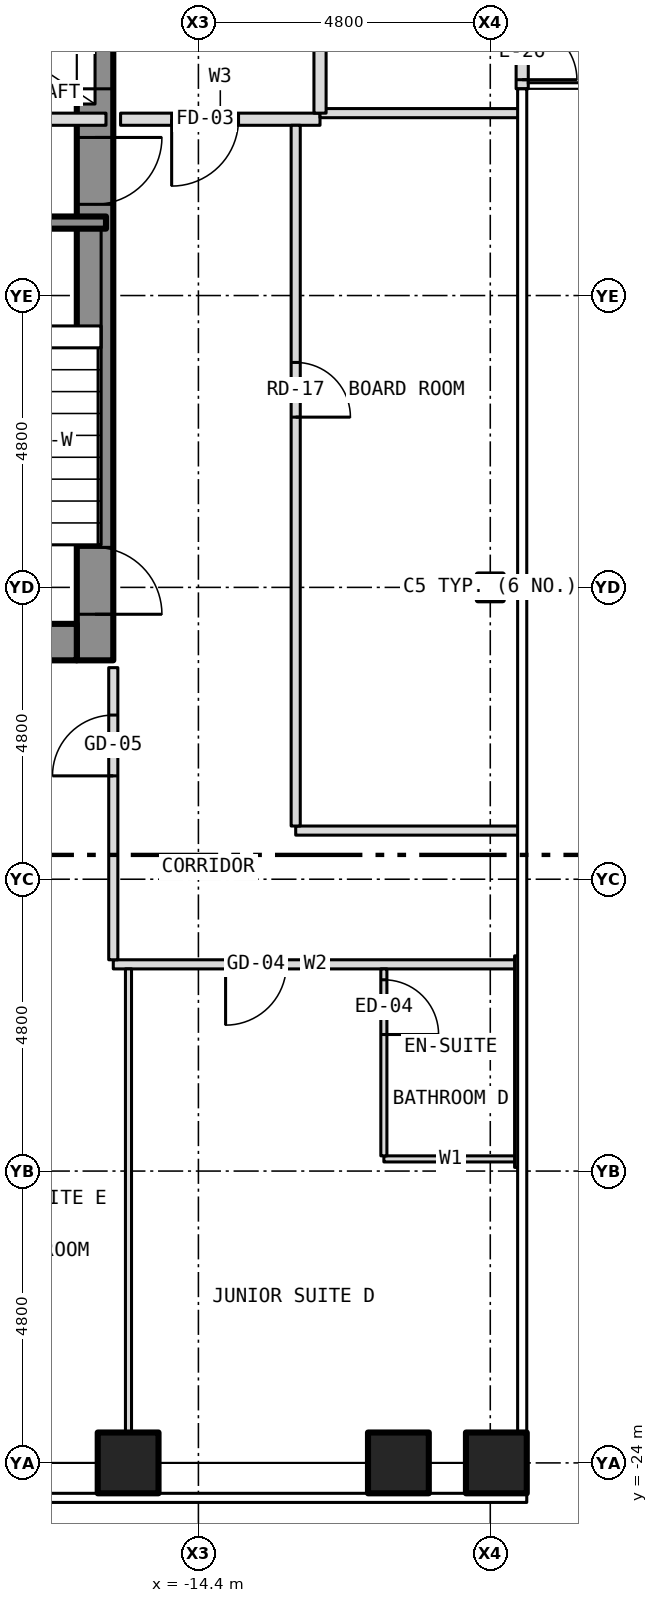
"""IFC4 building model, lengths in metres.
Left out: names, types, materials, properties, quantities, classifications, styles, units other than length and angle.
Written with IfcOpenShell. Run it as: python <this file> out.ifc"""

import sys

from ifc_helpers import new_model, si_unit, direction, frame, frame_2d, origin, origin_2d, place, context, subcontext, project, spatial, rectangle, hollow_rectangle, i_section, extrude, element, fill, save


model = new_model("IFC4")
c1 = context("Model", 3, precision=1e-05, world=origin(), true_north=direction((0.0, 1.0)))
c2 = subcontext(c1, "Body", "Model", "MODEL_VIEW")
j1 = project(units=[si_unit("LENGTHUNIT", "METRE"), si_unit("PLANEANGLEUNIT", "RADIAN")], contexts=[c1])
p1 = place(None, origin())
s1 = spatial("IfcSite", under=j1, at=p1, CompositionType="ELEMENT")
p2 = place(p1, origin())
s2 = spatial("IfcBuilding", under=s1, at=p2, CompositionType="ELEMENT")
p3 = place(p2, frame((0.0, 0.0, 67.0)))
s3 = spatial("IfcBuildingStorey", under=s2, at=p3, CompositionType="ELEMENT", Elevation=67.0)
for number, where, z_axis, x_axis in (
    (1, (-15.556, -24.0, -0.15), (0.0, 0.0, 1.0), (1.0, 0.0, 0.0)),
    (2, (-11.111, -24.0, -0.15), (0.0, 0.0, 1.0), (1.0, 0.0, 0.0)),
    (3, (-9.5, -24.0, -0.15), (0.0, 0.0, 1.0), (1.0, 0.0, 0.0)),
):
    element("IfcColumn", number, at=place(p3, frame(where, z_axis=z_axis, x_axis=x_axis)), inside=s3, PredefinedType="COLUMN", context=c2, shape_type="SweptSolid", body=[
        extrude(hollow_rectangle(XDim=1.0, YDim=1.0, WallThickness=0.06, at=origin_2d()), origin(), (0.0, 0.0, 1.0), 3.5),
    ])
p4 = place(p3, frame((-9.6, -9.6, -0.15), z_axis=(0.0, 0.0, 1.0), x_axis=(1.0, 0.0, 0.0)))
e4 = element("IfcColumn", 4, at=p4, inside=s3, PredefinedType="COLUMN", context=c2, shape_type="SweptSolid", body=[
    extrude(i_section(OverallWidth=0.409, OverallDepth=0.424, WebThickness=0.033, FlangeThickness=0.052, at=origin_2d()), origin(), (0.0, 0.0, 1.0), 3.5),
])
p5 = place(p3, frame((-16.1, -10.8, 0.0), z_axis=(0.0, 0.0, 1.0), x_axis=(0.0, 1.0, 0.0)))
e5 = element("IfcWall", 5, at=p5, inside=s3, PredefinedType="SHEAR", context=c2, shape_type="SweptSolid", body=[
    extrude(rectangle(XDim=21.6, YDim=0.6, at=frame_2d((10.8, 0.0))), origin(), (0.0, 0.0, 1.0), 3.25),
])
p6 = place(p5, frame((9.4, 0.0, 0.0)))
e6 = element("IfcOpeningElement", 6, at=p6, cuts=e5, PredefinedType="OPENING", context=c2, shape_type="SweptSolid", body=[
    extrude(rectangle(XDim=1.1, YDim=2.1, at=frame_2d((0.55, 1.05))), frame((0.0, 0.312, 0.0), z_axis=(0.0, -1.0, 0.0), x_axis=(1.0, 0.0, 0.0)), (0.0, 0.0, 1.0), 0.624),
])
p7 = place(p5, frame((11.5, 0.0, 0.0)))
e7 = element("IfcOpeningElement", 7, at=p7, cuts=e5, PredefinedType="OPENING", context=c2, shape_type="SweptSolid", body=[
    extrude(rectangle(XDim=1.1, YDim=2.1, at=frame_2d((0.55, 1.05))), frame((0.0, 0.312, 0.0), z_axis=(0.0, -1.0, 0.0), x_axis=(1.0, 0.0, 0.0)), (0.0, 0.0, 1.0), 0.624),
])
p8 = place(p5, frame((13.6, 0.0, 0.0)))
e8 = element("IfcOpeningElement", 8, at=p8, cuts=e5, PredefinedType="OPENING", context=c2, shape_type="SweptSolid", body=[
    extrude(rectangle(XDim=1.1, YDim=2.1, at=frame_2d((0.55, 1.05))), frame((0.0, 0.312, 0.0), z_axis=(0.0, -1.0, 0.0), x_axis=(1.0, 0.0, 0.0)), (0.0, 0.0, 1.0), 0.624),
])
p9 = place(p5, frame((15.7, 0.0, 0.0)))
e9 = element("IfcOpeningElement", 9, at=p9, cuts=e5, PredefinedType="OPENING", context=c2, shape_type="SweptSolid", body=[
    extrude(rectangle(XDim=1.1, YDim=2.1, at=frame_2d((0.55, 1.05))), frame((0.0, 0.312, 0.0), z_axis=(0.0, -1.0, 0.0), x_axis=(1.0, 0.0, 0.0)), (0.0, 0.0, 1.0), 0.624),
])
p10 = place(p5, frame((17.8, 0.0, 0.0)))
e10 = element("IfcOpeningElement", 10, at=p10, cuts=e5, PredefinedType="OPENING", context=c2, shape_type="SweptSolid", body=[
    extrude(rectangle(XDim=1.1, YDim=2.1, at=frame_2d((0.55, 1.05))), frame((0.0, 0.312, 0.0), z_axis=(0.0, -1.0, 0.0), x_axis=(1.0, 0.0, 0.0)), (0.0, 0.0, 1.0), 0.624),
])
p11 = place(p5, frame((0.758, 0.0, 0.0)))
e11 = element("IfcOpeningElement", 11, at=p11, cuts=e5, PredefinedType="OPENING", context=c2, shape_type="SweptSolid", body=[
    extrude(rectangle(XDim=1.1, YDim=2.1, at=frame_2d((0.55, 1.05))), frame((0.0, 0.312, 0.0), z_axis=(0.0, -1.0, 0.0), x_axis=(1.0, 0.0, 0.0)), (0.0, 0.0, 1.0), 0.624),
])
p12 = place(p5, frame((7.5, 0.0, 0.0)))
e12 = element("IfcOpeningElement", 12, at=p12, cuts=e5, PredefinedType="OPENING", context=c2, shape_type="SweptSolid", body=[
    extrude(rectangle(XDim=1.1, YDim=2.1, at=frame_2d((0.55, 1.05))), frame((0.0, 0.312, 0.0), z_axis=(0.0, -1.0, 0.0), x_axis=(1.0, 0.0, 0.0)), (0.0, 0.0, 1.0), 0.624),
])
p13 = place(p3, frame((-23.4, -10.5, 0.0), z_axis=(0.0, 0.0, 1.0), x_axis=(1.0, 0.0, 0.0)))
e13 = element("IfcWall", 13, at=p13, inside=s3, PredefinedType="SHEAR", context=c2, shape_type="SweptSolid", body=[
    extrude(rectangle(XDim=7.0, YDim=0.6, at=frame_2d((3.5, 0.0))), origin(), (0.0, 0.0, 1.0), 3.25),
])
p14 = place(p3, frame((-9.075, -1.4, 0.0), z_axis=(0.0, 0.0, 1.0), x_axis=(0.0, 1.0, 0.0)))
e14 = element("IfcWall", 14, at=p14, inside=s3, PredefinedType="SOLIDWALL", context=c2, shape_type="SweptSolid", body=[
    extrude(rectangle(XDim=2.8, YDim=0.2, at=frame_2d((1.4, 0.0))), origin(), (0.0, 0.0, 1.0), 3.5),
])
p15 = place(p14, frame((0.15, 0.0, 0.0)))
e15 = element("IfcOpeningElement", 15, at=p15, cuts=e14, PredefinedType="OPENING", context=c2, shape_type="SweptSolid", body=[
    extrude(rectangle(XDim=0.9, YDim=2.1, at=frame_2d((0.45, 1.05))), frame((0.0, 0.112, 0.0), z_axis=(0.0, -1.0, 0.0), x_axis=(1.0, 0.0, 0.0)), (0.0, 0.0, 1.0), 0.224),
])
p16 = place(p14, frame((1.75, 0.0, 0.0)))
e16 = element("IfcOpeningElement", 16, at=p16, cuts=e14, PredefinedType="OPENING", context=c2, shape_type="SweptSolid", body=[
    extrude(rectangle(XDim=0.9, YDim=2.1, at=frame_2d((0.45, 1.05))), frame((0.0, 0.112, 0.0), z_axis=(0.0, -1.0, 0.0), x_axis=(1.0, 0.0, 0.0)), (0.0, 0.0, 1.0), 0.224),
])
p17 = place(p3, frame((-11.35, -19.0, 0.0), z_axis=(0.0, 0.0, 1.0), x_axis=(1.0, 0.0, 0.0)))
e17 = element("IfcWall", 17, at=p17, inside=s3, PredefinedType="PARTITIONING", context=c2, shape_type="SweptSolid", body=[
    extrude(rectangle(XDim=2.2, YDim=0.1, at=frame_2d((1.1, 0.0))), origin(), (0.0, 0.0, 1.0), 3.35),
])
p18 = place(p3, frame((-15.8, -15.8, 0.0), z_axis=(0.0, 0.0, 1.0), x_axis=(1.0, 0.0, 0.0)))
e18 = element("IfcWall", 18, at=p18, inside=s3, PredefinedType="PARTITIONING", context=c2, shape_type="SweptSolid", body=[
    extrude(rectangle(XDim=6.65, YDim=0.15, at=frame_2d((3.325, 0.0))), origin(), (0.0, 0.0, 1.0), 3.35),
])
p19 = place(p18, frame((1.847, 0.0, 0.0)))
e19 = element("IfcOpeningElement", 19, at=p19, cuts=e18, PredefinedType="OPENING", context=c2, shape_type="SweptSolid", body=[
    extrude(rectangle(XDim=1.0, YDim=2.1, at=frame_2d((0.5, 1.05))), frame((0.0, 0.087, 0.0), z_axis=(0.0, -1.0, 0.0), x_axis=(1.0, 0.0, 0.0)), (0.0, 0.0, 1.0), 0.174),
])
p20 = place(p3, frame((-12.8, -13.6, 0.0), z_axis=(0.0, 0.0, 1.0), x_axis=(1.0, 0.0, 0.0)))
e20 = element("IfcWall", 20, at=p20, inside=s3, PredefinedType="PARTITIONING", context=c2, shape_type="SweptSolid", body=[
    extrude(rectangle(XDim=3.68, YDim=0.15, at=frame_2d((1.84, 0.0))), origin(), (0.0, 0.0, 1.0), 3.35),
])
p21 = place(p3, frame((-20.0, -3.6, 0.0), z_axis=(0.0, 0.0, 1.0), x_axis=(1.0, 0.0, 0.0)))
e21 = element("IfcWall", 21, at=p21, inside=s3, PredefinedType="SHEAR", context=c2, shape_type="SweptSolid", body=[
    extrude(rectangle(XDim=4.08, YDim=0.2, at=frame_2d((2.04, 0.0))), origin(), (0.0, 0.0, 1.0), 3.25),
])
p22 = place(p3, frame((-23.88, -1.9, 0.0), z_axis=(0.0, 0.0, 1.0), x_axis=(1.0, 0.0, 0.0)))
e22 = element("IfcWall", 22, at=p22, inside=s3, PredefinedType="PARTITIONING", context=c2, shape_type="SweptSolid", body=[
    extrude(rectangle(XDim=7.96, YDim=0.2, at=frame_2d((3.98, 0.0))), origin(), (0.0, 0.0, 1.0), 3.25),
])
p23 = place(p22, frame((3.32, 0.0, 0.0)))
e23 = element("IfcOpeningElement", 23, at=p23, cuts=e22, PredefinedType="OPENING", context=c2, shape_type="SweptSolid", body=[
    extrude(rectangle(XDim=0.9, YDim=2.1, at=frame_2d((0.45, 1.05))), frame((0.0, 0.112, 0.0), z_axis=(0.0, -1.0, 0.0), x_axis=(1.0, 0.0, 0.0)), (0.0, 0.0, 1.0), 0.224),
])
p24 = place(p3, frame((-15.68, -1.9, 0.0), z_axis=(0.0, 0.0, 1.0), x_axis=(1.0, 0.0, 0.0)))
e24 = element("IfcWall", 24, at=p24, inside=s3, PredefinedType="PARTITIONING", context=c2, shape_type="SweptSolid", body=[
    extrude(rectangle(XDim=3.28, YDim=0.2, at=frame_2d((1.64, 0.0))), origin(), (0.0, 0.0, 1.0), 3.35),
])
p25 = place(p24, frame((0.84, 0.0, 0.0)))
e25 = element("IfcOpeningElement", 25, at=p25, cuts=e24, PredefinedType="OPENING", context=c2, shape_type="SweptSolid", body=[
    extrude(rectangle(XDim=1.1, YDim=2.1, at=frame_2d((0.55, 1.05))), frame((0.0, 0.112, 0.0), z_axis=(0.0, -1.0, 0.0), x_axis=(1.0, 0.0, 0.0)), (0.0, 0.0, 1.0), 0.224),
])
p26 = place(p3, frame((-12.4, -1.8, 0.0), z_axis=(0.0, 0.0, 1.0), x_axis=(1.0, 0.0, 0.0)))
e26 = element("IfcWall", 26, at=p26, inside=s3, PredefinedType="PARTITIONING", context=c2, shape_type="SweptSolid", body=[
    extrude(rectangle(XDim=3.28, YDim=0.15, at=frame_2d((1.64, 0.0))), origin(), (0.0, 0.0, 1.0), 3.35),
])
p27 = place(p3, frame((-15.8, -15.725, 0.0), z_axis=(0.0, 0.0, 1.0), x_axis=(0.0, 1.0, 0.0)))
e27 = element("IfcWall", 27, at=p27, inside=s3, PredefinedType="PARTITIONING", context=c2, shape_type="SweptSolid", body=[
    extrude(rectangle(XDim=4.805, YDim=0.15, at=frame_2d((2.403, 0.0))), origin(), (0.0, 0.0, 1.0), 3.35),
])
p28 = place(p27, frame((3.025, 0.0, 0.0)))
e28 = element("IfcOpeningElement", 28, at=p28, cuts=e27, PredefinedType="OPENING", context=c2, shape_type="SweptSolid", body=[
    extrude(rectangle(XDim=1.0, YDim=2.1, at=frame_2d((0.5, 1.05))), frame((0.0, 0.087, 0.0), z_axis=(0.0, -1.0, 0.0), x_axis=(1.0, 0.0, 0.0)), (0.0, 0.0, 1.0), 0.174),
])
p29 = place(p3, frame((-15.55, -23.88, 0.0), z_axis=(0.0, 0.0, 1.0), x_axis=(0.0, 1.0, 0.0)))
e29 = element("IfcWall", 29, at=p29, inside=s3, PredefinedType="PARTITIONING", context=c2, shape_type="SweptSolid", body=[
    extrude(rectangle(XDim=8.005, YDim=0.1, at=frame_2d((4.002, 0.0))), origin(), (0.0, 0.0, 1.0), 3.35),
])
p30 = place(p3, frame((-12.8, -13.525, 0.0), z_axis=(0.0, 0.0, 1.0), x_axis=(0.0, 1.0, 0.0)))
e30 = element("IfcWall", 30, at=p30, inside=s3, PredefinedType="PARTITIONING", context=c2, shape_type="SweptSolid", body=[
    extrude(rectangle(XDim=11.525, YDim=0.15, at=frame_2d((5.762, 0.0))), origin(), (0.0, 0.0, 1.0), 3.35),
])
p31 = place(p30, frame((6.725, 0.0, 0.0)))
e31 = element("IfcOpeningElement", 31, at=p31, cuts=e30, PredefinedType="OPENING", context=c2, shape_type="SweptSolid", body=[
    extrude(rectangle(XDim=0.9, YDim=2.1, at=frame_2d((0.45, 1.05))), frame((0.0, 0.087, 0.0), z_axis=(0.0, -1.0, 0.0), x_axis=(1.0, 0.0, 0.0)), (0.0, 0.0, 1.0), 0.174),
])
p32 = place(p3, frame((-12.4, -1.8, 0.0), z_axis=(0.0, 0.0, 1.0), x_axis=(0.0, 1.0, 0.0)))
e32 = element("IfcWall", 32, at=p32, inside=s3, PredefinedType="PARTITIONING", context=c2, shape_type="SweptSolid", body=[
    extrude(rectangle(XDim=4.0, YDim=0.2, at=frame_2d((2.0, 0.0))), origin(), (0.0, 0.0, 1.0), 3.35),
])
p33 = place(p32, frame((1.25, 0.0, 0.0)))
e33 = element("IfcOpeningElement", 33, at=p33, cuts=e32, PredefinedType="OPENING", context=c2, shape_type="SweptSolid", body=[
    extrude(rectangle(XDim=1.1, YDim=2.1, at=frame_2d((0.55, 1.05))), frame((0.0, 0.112, 0.0), z_axis=(0.0, -1.0, 0.0), x_axis=(1.0, 0.0, 0.0)), (0.0, 0.0, 1.0), 0.224),
])
p34 = place(p3, frame((-11.35, -18.95, 0.0), z_axis=(0.0, 0.0, 1.0), x_axis=(0.0, 1.0, 0.0)))
e34 = element("IfcWall", 34, at=p34, inside=s3, PredefinedType="PARTITIONING", context=c2, shape_type="SweptSolid", body=[
    extrude(rectangle(XDim=3.075, YDim=0.1, at=frame_2d((1.538, 0.0))), origin(), (0.0, 0.0, 1.0), 3.35),
])
p35 = place(p34, frame((1.996, 0.0, 0.0)))
e35 = element("IfcOpeningElement", 35, at=p35, cuts=e34, PredefinedType="OPENING", context=c2, shape_type="SweptSolid", body=[
    extrude(rectangle(XDim=0.9, YDim=2.1, at=frame_2d((0.45, 1.05))), frame((0.0, 0.062, 0.0), z_axis=(0.0, -1.0, 0.0), x_axis=(1.0, 0.0, 0.0)), (0.0, 0.0, 1.0), 0.124),
])
p36 = place(p3, frame((-9.15, -19.14, 0.0), z_axis=(0.0, 0.0, 1.0), x_axis=(0.0, 1.0, 0.0)))
e36 = element("IfcWall", 36, at=p36, inside=s3, PredefinedType="PARTITIONING", context=c2, shape_type="SweptSolid", body=[
    extrude(rectangle(XDim=3.48, YDim=0.1, at=frame_2d((1.74, 0.0))), origin(), (0.0, 0.0, 1.0), 2.733),
])
p37 = place(p15, origin())
e37 = element("IfcDoor", 37, at=p37, inside=s3, OperationType="SINGLE_SWING_LEFT", PredefinedType="DOOR", context=c2, shape_type="SweptSolid", body=[
    extrude(rectangle(XDim=0.9, YDim=2.1, at=frame_2d((0.45, 1.05))), frame((0.0, 0.025, 0.0), z_axis=(0.0, -1.0, 0.0), x_axis=(1.0, 0.0, 0.0)), (0.0, 0.0, 1.0), 0.05),
])
fill(e15, e37)
p38 = place(p6, origin())
e38 = element("IfcDoor", 38, at=p38, inside=s3, OperationType="SLIDING_TO_LEFT", PredefinedType="DOOR", context=c2, shape_type="SweptSolid", body=[
    extrude(rectangle(XDim=1.1, YDim=2.1, at=frame_2d((0.55, 1.05))), frame((0.0, 0.025, 0.0), z_axis=(0.0, -1.0, 0.0), x_axis=(1.0, 0.0, 0.0)), (0.0, 0.0, 1.0), 0.05),
])
fill(e6, e38)
p39 = place(p11, origin())
e39 = element("IfcDoor", 39, at=p39, inside=s3, OperationType="SINGLE_SWING_LEFT", PredefinedType="DOOR", context=c2, shape_type="SweptSolid", body=[
    extrude(rectangle(XDim=1.1, YDim=2.1, at=frame_2d((0.55, 1.05))), frame((0.0, 0.025, 0.0), z_axis=(0.0, -1.0, 0.0), x_axis=(1.0, 0.0, 0.0)), (0.0, 0.0, 1.0), 0.05),
])
fill(e11, e39)
p40 = place(p12, origin())
e40 = element("IfcDoor", 40, at=p40, inside=s3, OperationType="SINGLE_SWING_RIGHT", PredefinedType="DOOR", context=c2, shape_type="SweptSolid", body=[
    extrude(rectangle(XDim=1.1, YDim=2.1, at=frame_2d((0.55, 1.05))), frame((0.0, 0.025, 0.0), z_axis=(0.0, -1.0, 0.0), x_axis=(1.0, 0.0, 0.0)), (0.0, 0.0, 1.0), 0.05),
])
fill(e12, e40)
p41 = place(p25, origin())
e41 = element("IfcDoor", 41, at=p41, inside=s3, OperationType="SINGLE_SWING_LEFT", PredefinedType="DOOR", context=c2, shape_type="SweptSolid", body=[
    extrude(rectangle(XDim=1.1, YDim=2.1, at=frame_2d((0.55, 1.05))), frame((0.0, 0.025, 0.0), z_axis=(0.0, -1.0, 0.0), x_axis=(1.0, 0.0, 0.0)), (0.0, 0.0, 1.0), 0.05),
])
fill(e25, e41)
p42 = place(p19, origin())
e42 = element("IfcDoor", 42, at=p42, inside=s3, OperationType="SINGLE_SWING_LEFT", PredefinedType="DOOR", context=c2, shape_type="SweptSolid", body=[
    extrude(rectangle(XDim=1.0, YDim=2.1, at=frame_2d((0.5, 1.05))), frame((0.0, 0.025, 0.0), z_axis=(0.0, -1.0, 0.0), x_axis=(1.0, 0.0, 0.0)), (0.0, 0.0, 1.0), 0.05),
])
fill(e19, e42)
p43 = place(p35, origin())
e43 = element("IfcDoor", 43, at=p43, inside=s3, OperationType="SINGLE_SWING_LEFT", PredefinedType="DOOR", context=c2, shape_type="SweptSolid", body=[
    extrude(rectangle(XDim=0.9, YDim=2.1, at=frame_2d((0.45, 1.05))), frame((0.0, 0.025, 0.0), z_axis=(0.0, -1.0, 0.0), x_axis=(1.0, 0.0, 0.0)), (0.0, 0.0, 1.0), 0.05),
])
fill(e35, e43)
p44 = place(p28, origin())
e44 = element("IfcDoor", 44, at=p44, inside=s3, OperationType="SINGLE_SWING_LEFT", PredefinedType="DOOR", context=c2, shape_type="SweptSolid", body=[
    extrude(rectangle(XDim=1.0, YDim=2.1, at=frame_2d((0.5, 1.05))), frame((0.0, 0.025, 0.0), z_axis=(0.0, -1.0, 0.0), x_axis=(1.0, 0.0, 0.0)), (0.0, 0.0, 1.0), 0.05),
])
fill(e28, e44)
p45 = place(p31, origin())
e45 = element("IfcDoor", 45, at=p45, inside=s3, OperationType="SINGLE_SWING_LEFT", PredefinedType="DOOR", context=c2, shape_type="SweptSolid", body=[
    extrude(rectangle(XDim=0.9, YDim=2.1, at=frame_2d((0.45, 1.05))), frame((0.0, 0.025, 0.0), z_axis=(0.0, -1.0, 0.0), x_axis=(1.0, 0.0, 0.0)), (0.0, 0.0, 1.0), 0.05),
])
fill(e31, e45)
save(model, sys.argv[1])
